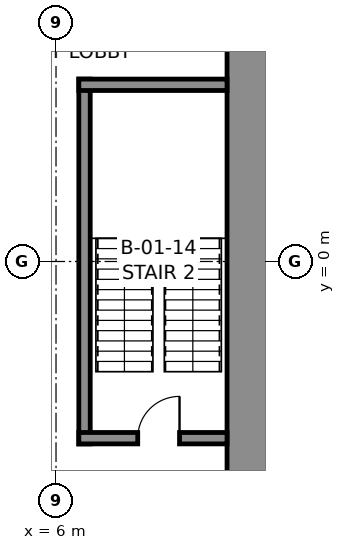
"""IFC4 building model, lengths in metres.
Left out: names, types, materials, properties, quantities, classifications, styles, units other than length and angle.
Written with IfcOpenShell. Run it as: python <this file> out.ifc"""

import sys

from ifc_helpers import new_model, si_unit, direction, frame, frame_2d, origin, place, context, subcontext, project, spatial, rectangle, extrude, element, fill, save


model = new_model("IFC4")
c1 = context("Model", 3, precision=1e-05, world=origin(), true_north=direction((0.0, 1.0)))
c2 = subcontext(c1, "Body", "Model", "MODEL_VIEW")
j1 = project(units=[si_unit("LENGTHUNIT", "METRE"), si_unit("PLANEANGLEUNIT", "RADIAN")], contexts=[c1])
p1 = place(None, origin())
s1 = spatial("IfcSite", under=j1, at=p1, CompositionType="ELEMENT")
p2 = place(p1, origin())
s2 = spatial("IfcBuilding", under=s1, at=p2, CompositionType="ELEMENT")
p3 = place(p2, frame((0.0, 0.0, -5.0)))
s3 = spatial("IfcBuildingStorey", under=s2, at=p3, CompositionType="ELEMENT", Elevation=-5.0)
p4 = place(p3, frame((11.25, 10.5, -0.3), z_axis=(0.0, 0.0, 1.0), x_axis=(0.0, -1.0, 0.0)))
e1 = element("IfcWall", 1, at=p4, inside=s3, PredefinedType="SHEAR", context=c2, shape_type="SweptSolid", body=[
    extrude(rectangle(XDim=21.0, YDim=1.5, at=frame_2d((10.5, 0.0))), origin(), (0.0, 0.0, 1.0), 5.3),
])
p5 = place(p4, frame((3.7, 0.0, 0.3)))
e2 = element("IfcOpeningElement", 2, at=p5, cuts=e1, PredefinedType="OPENING", context=c2, shape_type="SweptSolid", body=[
    extrude(rectangle(XDim=1.2, YDim=2.3, at=frame_2d((0.6, 1.15))), frame((0.0, 0.76, 0.0), z_axis=(0.0, -1.0, 0.0), x_axis=(1.0, 0.0, 0.0)), (0.0, 0.0, 1.0), 1.52),
])
p6 = place(p4, frame((16.1, 0.0, 0.3)))
e3 = element("IfcOpeningElement", 3, at=p6, cuts=e1, PredefinedType="OPENING", context=c2, shape_type="SweptSolid", body=[
    extrude(rectangle(XDim=1.2, YDim=2.3, at=frame_2d((0.6, 1.15))), frame((0.0, 0.76, 0.0), z_axis=(0.0, -1.0, 0.0), x_axis=(1.0, 0.0, 0.0)), (0.0, 0.0, 1.0), 1.52),
])
p7 = place(p3, frame((6.75, -4.8, 0.0), z_axis=(0.0, 0.0, 1.0), x_axis=(0.0, 1.0, 0.0)))
e4 = element("IfcWall", 4, at=p7, inside=s3, PredefinedType="SOLIDWALL", context=c2, shape_type="SweptSolid", body=[
    extrude(rectangle(XDim=9.6, YDim=0.3, at=frame_2d((4.8, 0.0))), origin(), (0.0, 0.0, 1.0), 4.75),
])
p8 = place(p3, frame((6.6, 4.65, 0.0), z_axis=(0.0, 0.0, 1.0), x_axis=(1.0, 0.0, 0.0)))
e5 = element("IfcWall", 5, at=p8, inside=s3, PredefinedType="SOLIDWALL", context=c2, shape_type="SweptSolid", body=[
    extrude(rectangle(XDim=3.9, YDim=0.3, at=frame_2d((1.95, 0.0))), origin(), (0.0, 0.0, 1.0), 4.75),
])
p9 = place(p3, frame((10.5, -4.65, 0.0), z_axis=(0.0, 0.0, 1.0), x_axis=(-1.0, 0.0, 0.0)))
e6 = element("IfcWall", 6, at=p9, inside=s3, PredefinedType="SOLIDWALL", context=c2, shape_type="SweptSolid", body=[
    extrude(rectangle(XDim=3.9, YDim=0.3, at=frame_2d((1.95, 0.0))), origin(), (0.0, 0.0, 1.0), 4.75),
])
p10 = place(p9, frame((1.25, 0.0, 0.0)))
e7 = element("IfcOpeningElement", 7, at=p10, cuts=e6, PredefinedType="OPENING", context=c2, shape_type="SweptSolid", body=[
    extrude(rectangle(XDim=1.1, YDim=2.3, at=frame_2d((0.55, 1.15))), frame((0.0, 0.16, 0.0), z_axis=(0.0, -1.0, 0.0), x_axis=(1.0, 0.0, 0.0)), (0.0, 0.0, 1.0), 0.32),
])
p11 = place(p10, frame((1.1, 0.0, 0.0), z_axis=(0.0, 0.0, 1.0), x_axis=(-1.0, 0.0, 0.0)))
e8 = element("IfcDoor", 8, at=p11, inside=s3, OperationType="SINGLE_SWING_RIGHT", PredefinedType="DOOR", context=c2, shape_type="SweptSolid", body=[
    extrude(rectangle(XDim=1.1, YDim=2.3, at=frame_2d((0.55, 1.15))), frame((0.0, 0.025, 0.0), z_axis=(0.0, -1.0, 0.0), x_axis=(1.0, 0.0, 0.0)), (0.0, 0.0, 1.0), 0.05),
])
fill(e7, e8)
save(model, sys.argv[1])
